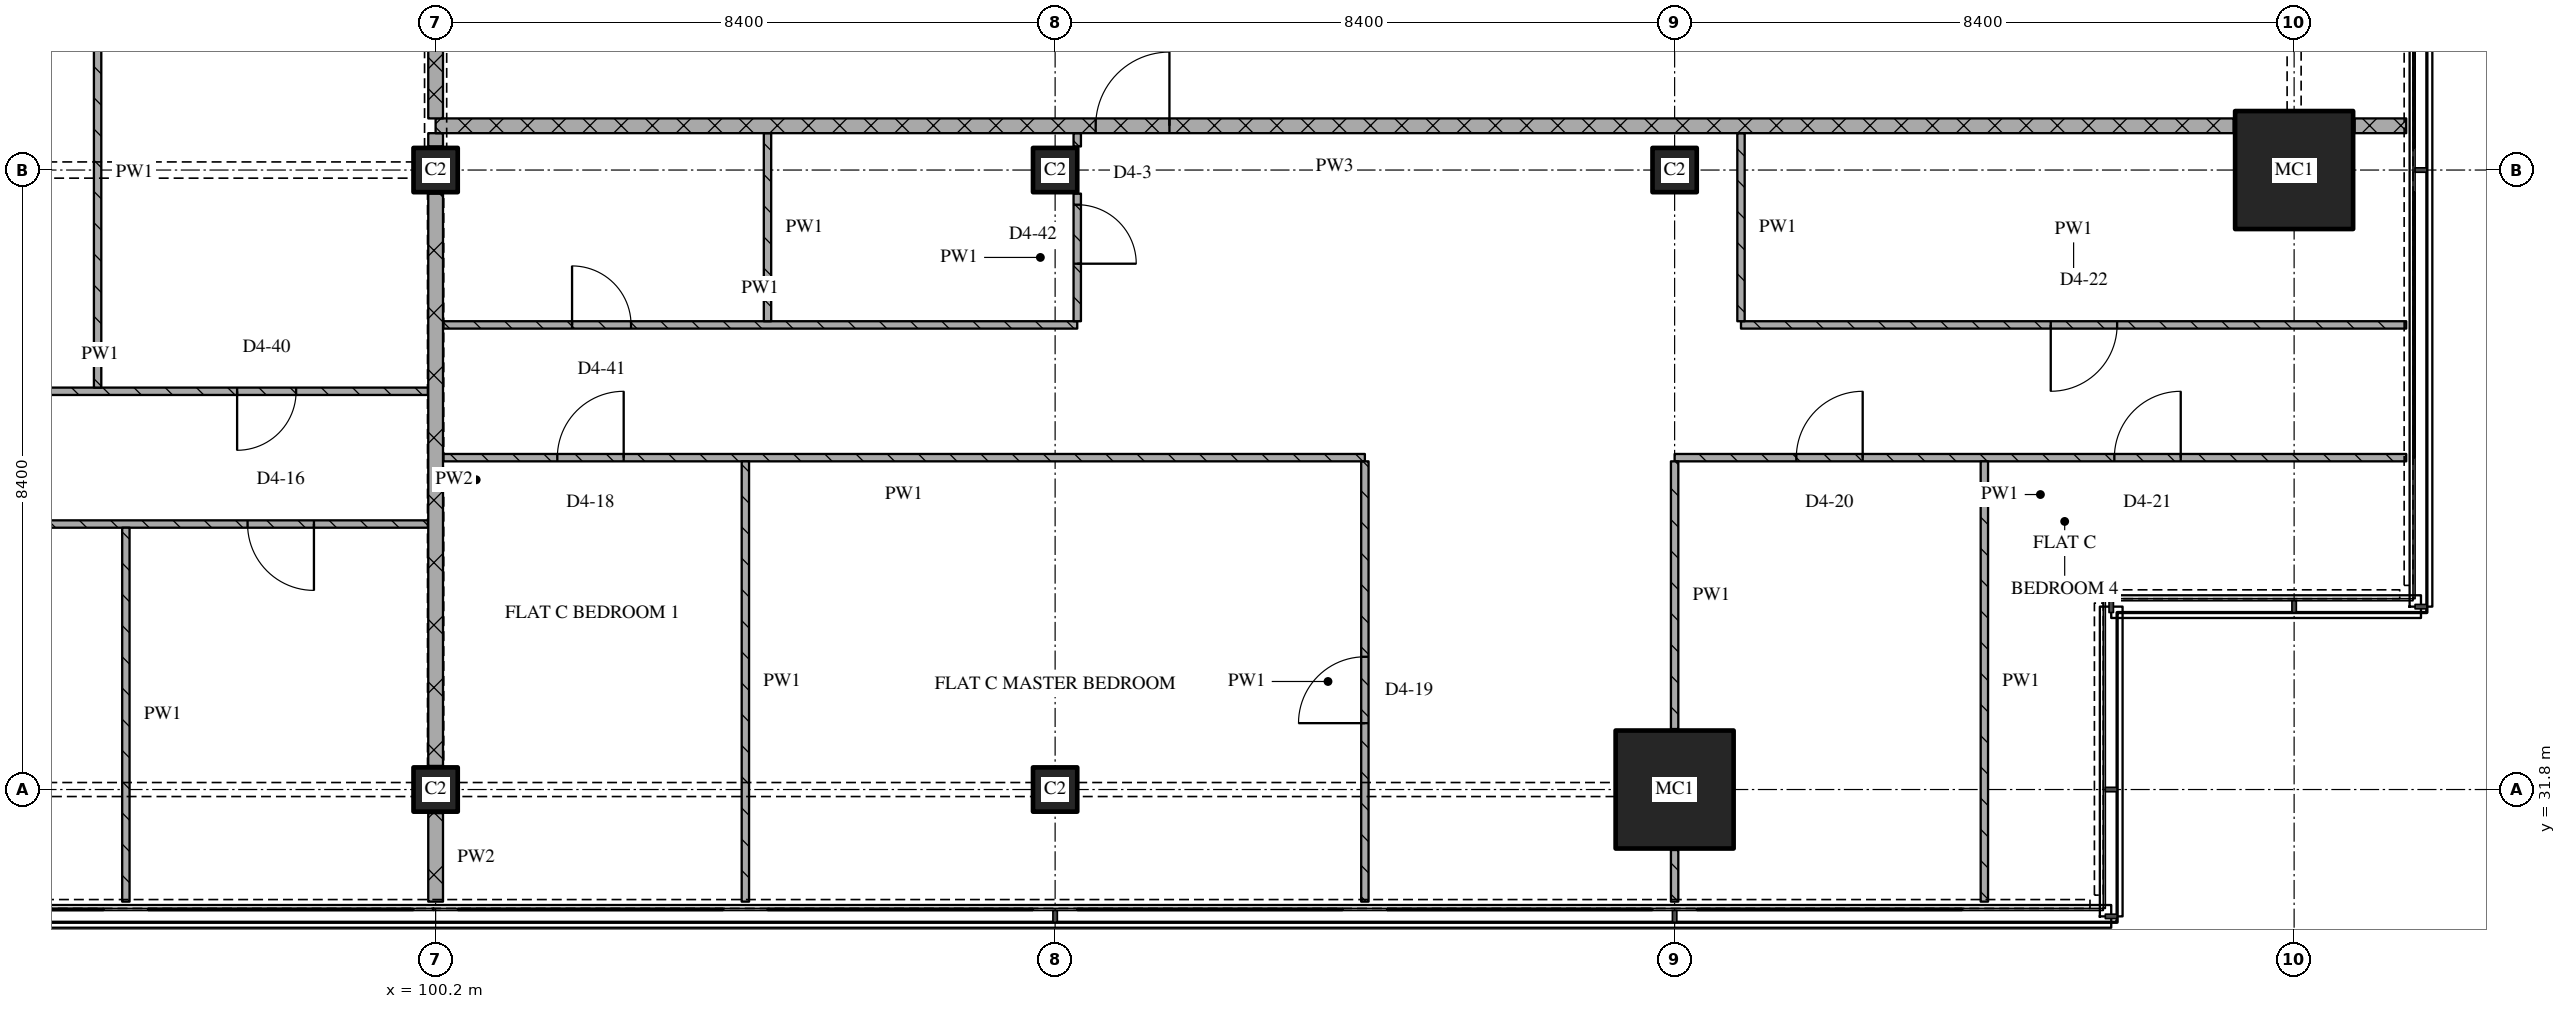
"""IFC4 building model, lengths in metres.
Left out: names, types, materials, properties, quantities, classifications, styles, units other than length and angle.
Written with IfcOpenShell. Run it as: python <this file> out.ifc"""

import sys

from ifc_helpers import new_model, si_unit, direction, frame, frame_2d, origin, origin_2d, place, context, subcontext, project, spatial, rectangle, extrude, element, fill, save


model = new_model("IFC4")
c1 = context("Model", 3, precision=1e-05, world=origin(), true_north=direction((0.0, 1.0)))
c2 = subcontext(c1, "Body", "Model", "MODEL_VIEW")
j1 = project(units=[si_unit("LENGTHUNIT", "METRE"), si_unit("PLANEANGLEUNIT", "RADIAN")], contexts=[c1])
p1 = place(None, origin())
s1 = spatial("IfcSite", under=j1, at=p1, CompositionType="ELEMENT")
p2 = place(p1, origin())
s2 = spatial("IfcBuilding", under=s1, at=p2, CompositionType="ELEMENT")
p3 = place(p2, frame((0.0, 0.0, 241.5)))
s3 = spatial("IfcBuildingStorey", under=s2, at=p3, CompositionType="ELEMENT", Elevation=241.5)
for number, where, z_axis, x_axis in (
    (1, (100.2, 31.8, 0.0), (0.0, 0.0, 1.0), (1.0, 0.0, 0.0)),
    (2, (100.2, 40.2, 0.0), (0.0, 0.0, 1.0), (1.0, 0.0, 0.0)),
    (3, (108.6, 31.8, 0.0), (0.0, 0.0, 1.0), (1.0, 0.0, 0.0)),
    (4, (108.6, 40.2, 0.0), (0.0, 0.0, 1.0), (1.0, 0.0, 0.0)),
):
    element("IfcColumn", number, at=place(p3, frame(where, z_axis=z_axis, x_axis=x_axis)), inside=s3, PredefinedType="COLUMN", context=c2, shape_type="SweptSolid", body=[
        extrude(rectangle(XDim=0.6, YDim=0.6, at=origin_2d()), origin(), (0.0, 0.0, 1.0), 3.6),
    ])
p4 = place(p3, frame((117.0, 31.8, 0.0), z_axis=(0.0, 0.0, 1.0), x_axis=(1.0, 0.0, 0.0)))
e5 = element("IfcColumn", 5, at=p4, inside=s3, PredefinedType="COLUMN", context=c2, shape_type="SweptSolid", body=[
    extrude(rectangle(XDim=1.6, YDim=1.6, at=origin_2d()), origin(), (0.0, 0.0, 1.0), 3.6),
])
p5 = place(p3, frame((117.0, 40.2, 0.0), z_axis=(0.0, 0.0, 1.0), x_axis=(1.0, 0.0, 0.0)))
e6 = element("IfcColumn", 6, at=p5, inside=s3, PredefinedType="COLUMN", context=c2, shape_type="SweptSolid", body=[
    extrude(rectangle(XDim=0.6, YDim=0.6, at=origin_2d()), origin(), (0.0, 0.0, 1.0), 3.6),
])
p6 = place(p3, frame((125.4, 40.2, 0.0), z_axis=(0.0, 0.0, 1.0), x_axis=(1.0, 0.0, 0.0)))
e7 = element("IfcColumn", 7, at=p6, inside=s3, PredefinedType="COLUMN", context=c2, shape_type="SweptSolid", body=[
    extrude(rectangle(XDim=1.6, YDim=1.6, at=origin_2d()), origin(), (0.0, 0.0, 1.0), 3.6),
])
p7 = place(p3, frame((100.1, 35.4, 0.0), z_axis=(0.0, 0.0, 1.0), x_axis=(-1.0, 0.0, 0.0)))
e8 = element("IfcWall", 8, at=p7, inside=s3, PredefinedType="PARTITIONING", context=c2, shape_type="SweptSolid", body=[
    extrude(rectangle(XDim=20.9, YDim=0.1, at=frame_2d((10.45, 0.0))), origin(), (0.0, 0.0, 1.0), 3.32),
])
p8 = place(p7, frame((1.55, 0.0, 0.0)))
e9 = element("IfcOpeningElement", 9, at=p8, cuts=e8, PredefinedType="OPENING", context=c2, shape_type="SweptSolid", body=[
    extrude(rectangle(XDim=0.9, YDim=2.1, at=frame_2d((0.45, 1.05))), frame((0.0, 0.06, 0.0), z_axis=(0.0, -1.0, 0.0), x_axis=(1.0, 0.0, 0.0)), (0.0, 0.0, 1.0), 0.12),
])
p9 = place(p7, frame((7.85, 0.0, 0.0)))
e10 = element("IfcOpeningElement", 10, at=p9, cuts=e8, PredefinedType="OPENING", context=c2, shape_type="SweptSolid", body=[
    extrude(rectangle(XDim=0.9, YDim=2.1, at=frame_2d((0.45, 1.05))), frame((0.0, 0.06, 0.0), z_axis=(0.0, -1.0, 0.0), x_axis=(1.0, 0.0, 0.0)), (0.0, 0.0, 1.0), 0.12),
])
p10 = place(p7, frame((16.25, 0.0, 0.0)))
e11 = element("IfcOpeningElement", 11, at=p10, cuts=e8, PredefinedType="OPENING", context=c2, shape_type="SweptSolid", body=[
    extrude(rectangle(XDim=0.9, YDim=2.1, at=frame_2d((0.45, 1.05))), frame((0.0, 0.06, 0.0), z_axis=(0.0, -1.0, 0.0), x_axis=(1.0, 0.0, 0.0)), (0.0, 0.0, 1.0), 0.12),
])
p11 = place(p3, frame((112.8, 36.3, 0.0), z_axis=(0.0, 0.0, 1.0), x_axis=(-1.0, 0.0, 0.0)))
e12 = element("IfcWall", 12, at=p11, inside=s3, PredefinedType="PARTITIONING", context=c2, shape_type="SweptSolid", body=[
    extrude(rectangle(XDim=12.5, YDim=0.1, at=frame_2d((6.25, 0.0))), origin(), (0.0, 0.0, 1.0), 3.32),
])
p12 = place(p11, frame((10.05, 0.0, 0.0)))
e13 = element("IfcOpeningElement", 13, at=p12, cuts=e12, PredefinedType="OPENING", context=c2, shape_type="SweptSolid", body=[
    extrude(rectangle(XDim=0.9, YDim=2.1, at=frame_2d((0.45, 1.05))), frame((0.0, 0.06, 0.0), z_axis=(0.0, -1.0, 0.0), x_axis=(1.0, 0.0, 0.0)), (0.0, 0.0, 1.0), 0.12),
])
p13 = place(p3, frame((126.92, 36.3, 0.0), z_axis=(0.0, 0.0, 1.0), x_axis=(-1.0, 0.0, 0.0)))
e14 = element("IfcWall", 14, at=p13, inside=s3, PredefinedType="PARTITIONING", context=c2, shape_type="SweptSolid", body=[
    extrude(rectangle(XDim=9.92, YDim=0.1, at=frame_2d((4.96, 0.0))), origin(), (0.0, 0.0, 1.0), 3.32),
])
p14 = place(p13, frame((3.058, 0.0, 0.0)))
e15 = element("IfcOpeningElement", 15, at=p14, cuts=e14, PredefinedType="OPENING", context=c2, shape_type="SweptSolid", body=[
    extrude(rectangle(XDim=0.9, YDim=2.1, at=frame_2d((0.45, 1.05))), frame((0.0, 0.06, 0.0), z_axis=(0.0, -1.0, 0.0), x_axis=(1.0, 0.0, 0.0)), (0.0, 0.0, 1.0), 0.12),
])
p15 = place(p13, frame((7.37, 0.0, 0.0)))
e16 = element("IfcOpeningElement", 16, at=p15, cuts=e14, PredefinedType="OPENING", context=c2, shape_type="SweptSolid", body=[
    extrude(rectangle(XDim=0.9, YDim=2.1, at=frame_2d((0.45, 1.05))), frame((0.0, 0.06, 0.0), z_axis=(0.0, -1.0, 0.0), x_axis=(1.0, 0.0, 0.0)), (0.0, 0.0, 1.0), 0.12),
])
p16 = place(p3, frame((91.2, 37.2, 0.0), z_axis=(0.0, 0.0, 1.0), x_axis=(1.0, 0.0, 0.0)))
e17 = element("IfcWall", 17, at=p16, inside=s3, PredefinedType="PARTITIONING", context=c2, shape_type="SweptSolid", body=[
    extrude(rectangle(XDim=8.9, YDim=0.1, at=frame_2d((4.45, 0.0))), origin(), (0.0, 0.0, 1.0), 3.32),
])
p17 = place(p16, frame((6.308, 0.0, 0.0)))
e18 = element("IfcOpeningElement", 18, at=p17, cuts=e17, PredefinedType="OPENING", context=c2, shape_type="SweptSolid", body=[
    extrude(rectangle(XDim=0.8, YDim=2.1, at=frame_2d((0.4, 1.05))), frame((0.0, 0.06, 0.0), z_axis=(0.0, -1.0, 0.0), x_axis=(1.0, 0.0, 0.0)), (0.0, 0.0, 1.0), 0.12),
])
p18 = place(p3, frame((100.3, 38.1, 0.0), z_axis=(0.0, 0.0, 1.0), x_axis=(1.0, 0.0, 0.0)))
e19 = element("IfcWall", 19, at=p18, inside=s3, PredefinedType="PARTITIONING", context=c2, shape_type="SweptSolid", body=[
    extrude(rectangle(XDim=8.6, YDim=0.1, at=frame_2d((4.3, 0.0))), origin(), (0.0, 0.0, 1.0), 3.32),
])
p19 = place(p18, frame((1.75, 0.0, 0.0)))
e20 = element("IfcOpeningElement", 20, at=p19, cuts=e19, PredefinedType="OPENING", context=c2, shape_type="SweptSolid", body=[
    extrude(rectangle(XDim=0.8, YDim=2.1, at=frame_2d((0.4, 1.05))), frame((0.0, 0.06, 0.0), z_axis=(0.0, -1.0, 0.0), x_axis=(1.0, 0.0, 0.0)), (0.0, 0.0, 1.0), 0.12),
])
p20 = place(p3, frame((117.9, 38.1, 0.0), z_axis=(0.0, 0.0, 1.0), x_axis=(1.0, 0.0, 0.0)))
e21 = element("IfcWall", 21, at=p20, inside=s3, PredefinedType="PARTITIONING", context=c2, shape_type="SweptSolid", body=[
    extrude(rectangle(XDim=9.02, YDim=0.1, at=frame_2d((4.51, 0.0))), origin(), (0.0, 0.0, 1.0), 3.32),
])
p21 = place(p20, frame((4.2, 0.0, 0.0)))
e22 = element("IfcOpeningElement", 22, at=p21, cuts=e21, PredefinedType="OPENING", context=c2, shape_type="SweptSolid", body=[
    extrude(rectangle(XDim=0.9, YDim=2.1, at=frame_2d((0.45, 1.05))), frame((0.0, 0.06, 0.0), z_axis=(0.0, -1.0, 0.0), x_axis=(1.0, 0.0, 0.0)), (0.0, 0.0, 1.0), 0.12),
])
p22 = place(p3, frame((124.58, 40.8, 0.0), z_axis=(0.0, 0.0, 1.0), x_axis=(-1.0, 0.0, 0.0)))
e23 = element("IfcWall", 23, at=p22, inside=s3, PredefinedType="PARTITIONING", context=c2, shape_type="SweptSolid", body=[
    extrude(rectangle(XDim=24.38, YDim=0.2, at=frame_2d((12.19, 0.0))), origin(), (0.0, 0.0, 1.0), 3.32),
])
p23 = place(p22, frame((14.43, 0.0, 0.0)))
e24 = element("IfcOpeningElement", 24, at=p23, cuts=e23, PredefinedType="OPENING", context=c2, shape_type="SweptSolid", body=[
    extrude(rectangle(XDim=1.0, YDim=2.1, at=frame_2d((0.5, 1.05))), frame((0.0, 0.11, 0.0), z_axis=(0.0, -1.0, 0.0), x_axis=(1.0, 0.0, 0.0)), (0.0, 0.0, 1.0), 0.22),
])
p24 = place(p3, frame((126.22, 40.8, 0.0), z_axis=(0.0, 0.0, 1.0), x_axis=(1.0, 0.0, 0.0)))
e25 = element("IfcWall", 25, at=p24, inside=s3, PredefinedType="PARTITIONING", context=c2, shape_type="SweptSolid", body=[
    extrude(rectangle(XDim=0.7, YDim=0.2, at=frame_2d((0.35, 0.0))), origin(), (0.0, 0.0, 1.0), 3.32),
])
p25 = place(p3, frame((95.617, 43.1, 0.0), z_axis=(0.0, 0.0, 1.0), x_axis=(0.0, -1.0, 0.0)))
e26 = element("IfcWall", 26, at=p25, inside=s3, PredefinedType="PARTITIONING", context=c2, shape_type="SweptSolid", body=[
    extrude(rectangle(XDim=5.85, YDim=0.1, at=frame_2d((2.925, 0.0))), origin(), (0.0, 0.0, 1.0), 3.32),
])
p26 = place(p3, frame((96.0, 35.35, 0.0), z_axis=(0.0, 0.0, 1.0), x_axis=(0.0, -1.0, 0.0)))
e27 = element("IfcWall", 27, at=p26, inside=s3, PredefinedType="PARTITIONING", context=c2, shape_type="SweptSolid", body=[
    extrude(rectangle(XDim=5.07, YDim=0.1, at=frame_2d((2.535, 0.0))), origin(), (0.0, 0.0, 1.0), 3.32),
])
p27 = place(p3, frame((100.2, 43.1, 0.0), z_axis=(0.0, 0.0, 1.0), x_axis=(0.0, -1.0, 0.0)))
e28 = element("IfcWall", 28, at=p27, inside=s3, PredefinedType="PARTITIONING", context=c2, shape_type="SweptSolid", body=[
    extrude(rectangle(XDim=2.2, YDim=0.2, at=frame_2d((1.1, 0.0))), origin(), (0.0, 0.0, 1.0), 2.53),
])
p28 = place(p3, frame((100.2, 31.48, 0.0), z_axis=(0.0, 0.0, 1.0), x_axis=(0.0, -1.0, 0.0)))
e29 = element("IfcWall", 29, at=p28, inside=s3, PredefinedType="PARTITIONING", context=c2, shape_type="SweptSolid", body=[
    extrude(rectangle(XDim=1.2, YDim=0.2, at=frame_2d((0.6, 0.0))), origin(), (0.0, 0.0, 1.0), 3.32),
])
p29 = place(p3, frame((100.2, 39.88, 0.0), z_axis=(0.0, 0.0, 1.0), x_axis=(0.0, -1.0, 0.0)))
e30 = element("IfcWall", 30, at=p29, inside=s3, PredefinedType="PARTITIONING", context=c2, shape_type="SweptSolid", body=[
    extrude(rectangle(XDim=7.76, YDim=0.2, at=frame_2d((3.88, 0.0))), origin(), (0.0, 0.0, 1.0), 2.72),
])
p30 = place(p3, frame((100.2, 40.7, 0.0), z_axis=(0.0, 0.0, 1.0), x_axis=(0.0, -1.0, 0.0)))
e31 = element("IfcWall", 31, at=p30, inside=s3, PredefinedType="PARTITIONING", context=c2, shape_type="SweptSolid", body=[
    extrude(rectangle(XDim=0.18, YDim=0.2, at=frame_2d((0.09, 0.0))), origin(), (0.0, 0.0, 1.0), 3.32),
])
p31 = place(p3, frame((104.4, 36.25, 0.0), z_axis=(0.0, 0.0, 1.0), x_axis=(0.0, -1.0, 0.0)))
e32 = element("IfcWall", 32, at=p31, inside=s3, PredefinedType="PARTITIONING", context=c2, shape_type="SweptSolid", body=[
    extrude(rectangle(XDim=5.97, YDim=0.1, at=frame_2d((2.985, 0.0))), origin(), (0.0, 0.0, 1.0), 3.32),
])
p32 = place(p3, frame((104.7, 40.7, 0.0), z_axis=(0.0, 0.0, 1.0), x_axis=(0.0, -1.0, 0.0)))
e33 = element("IfcWall", 33, at=p32, inside=s3, PredefinedType="PARTITIONING", context=c2, shape_type="SweptSolid", body=[
    extrude(rectangle(XDim=2.55, YDim=0.1, at=frame_2d((1.275, 0.0))), origin(), (0.0, 0.0, 1.0), 3.32),
])
p33 = place(p3, frame((108.9, 38.15, 0.0), z_axis=(0.0, 0.0, 1.0), x_axis=(0.0, 1.0, 0.0)))
e34 = element("IfcWall", 34, at=p33, inside=s3, PredefinedType="PARTITIONING", context=c2, shape_type="SweptSolid", body=[
    extrude(rectangle(XDim=1.73, YDim=0.1, at=frame_2d((0.865, 0.0))), origin(), (0.0, 0.0, 1.0), 3.32),
])
p34 = place(p33, frame((0.78, 0.0, 0.0)))
e35 = element("IfcOpeningElement", 35, at=p34, cuts=e34, PredefinedType="OPENING", context=c2, shape_type="SweptSolid", body=[
    extrude(rectangle(XDim=0.8, YDim=2.1, at=frame_2d((0.4, 1.05))), frame((0.0, 0.06, 0.0), z_axis=(0.0, -1.0, 0.0), x_axis=(1.0, 0.0, 0.0)), (0.0, 0.0, 1.0), 0.12),
])
p35 = place(p3, frame((108.9, 40.7, 0.0), z_axis=(0.0, 0.0, 1.0), x_axis=(0.0, -1.0, 0.0)))
e36 = element("IfcWall", 36, at=p35, inside=s3, PredefinedType="PARTITIONING", context=c2, shape_type="SweptSolid", body=[
    extrude(rectangle(XDim=0.18, YDim=0.1, at=frame_2d((0.09, 0.0))), origin(), (0.0, 0.0, 1.0), 3.32),
])
p36 = place(p3, frame((112.8, 30.28, 0.0), z_axis=(0.0, 0.0, 1.0), x_axis=(0.0, 1.0, 0.0)))
e37 = element("IfcWall", 37, at=p36, inside=s3, PredefinedType="PARTITIONING", context=c2, shape_type="SweptSolid", body=[
    extrude(rectangle(XDim=5.97, YDim=0.1, at=frame_2d((2.985, 0.0))), origin(), (0.0, 0.0, 1.0), 3.32),
])
p37 = place(p36, frame((2.42, 0.0, 0.0)))
e38 = element("IfcOpeningElement", 38, at=p37, cuts=e37, PredefinedType="OPENING", context=c2, shape_type="SweptSolid", body=[
    extrude(rectangle(XDim=0.9, YDim=2.1, at=frame_2d((0.45, 1.05))), frame((0.0, 0.06, 0.0), z_axis=(0.0, -1.0, 0.0), x_axis=(1.0, 0.0, 0.0)), (0.0, 0.0, 1.0), 0.12),
])
p38 = place(p3, frame((117.0, 30.98, 0.0), z_axis=(0.0, 0.0, 1.0), x_axis=(0.0, -1.0, 0.0)))
e39 = element("IfcWall", 39, at=p38, inside=s3, PredefinedType="PARTITIONING", context=c2, shape_type="SweptSolid", body=[
    extrude(rectangle(XDim=0.7, YDim=0.1, at=frame_2d((0.35, 0.0))), origin(), (0.0, 0.0, 1.0), 3.32),
])
p39 = place(p3, frame((117.0, 36.25, 0.0), z_axis=(0.0, 0.0, 1.0), x_axis=(0.0, -1.0, 0.0)))
e40 = element("IfcWall", 40, at=p39, inside=s3, PredefinedType="PARTITIONING", context=c2, shape_type="SweptSolid", body=[
    extrude(rectangle(XDim=3.63, YDim=0.1, at=frame_2d((1.815, 0.0))), origin(), (0.0, 0.0, 1.0), 3.32),
])
p40 = place(p3, frame((117.9, 40.7, 0.0), z_axis=(0.0, 0.0, 1.0), x_axis=(0.0, -1.0, 0.0)))
e41 = element("IfcWall", 41, at=p40, inside=s3, PredefinedType="PARTITIONING", context=c2, shape_type="SweptSolid", body=[
    extrude(rectangle(XDim=2.55, YDim=0.1, at=frame_2d((1.275, 0.0))), origin(), (0.0, 0.0, 1.0), 3.32),
])
p41 = place(p3, frame((121.2, 36.25, 0.0), z_axis=(0.0, 0.0, 1.0), x_axis=(0.0, -1.0, 0.0)))
e42 = element("IfcWall", 42, at=p41, inside=s3, PredefinedType="PARTITIONING", context=c2, shape_type="SweptSolid", body=[
    extrude(rectangle(XDim=5.97, YDim=0.1, at=frame_2d((2.985, 0.0))), origin(), (0.0, 0.0, 1.0), 3.32),
])
p42 = place(p8, origin())
e43 = element("IfcDoor", 43, at=p42, inside=s3, OperationType="SINGLE_SWING_LEFT", PredefinedType="DOOR", context=c2, shape_type="SweptSolid", body=[
    extrude(rectangle(XDim=0.9, YDim=2.1, at=frame_2d((0.45, 1.05))), frame((0.0, 0.025, 0.0), z_axis=(0.0, -1.0, 0.0), x_axis=(1.0, 0.0, 0.0)), (0.0, 0.0, 1.0), 0.05),
])
fill(e9, e43)
p43 = place(p12, origin())
e44 = element("IfcDoor", 44, at=p43, inside=s3, OperationType="SINGLE_SWING_RIGHT", PredefinedType="DOOR", context=c2, shape_type="SweptSolid", body=[
    extrude(rectangle(XDim=0.9, YDim=2.1, at=frame_2d((0.45, 1.05))), frame((0.0, 0.025, 0.0), z_axis=(0.0, -1.0, 0.0), x_axis=(1.0, 0.0, 0.0)), (0.0, 0.0, 1.0), 0.05),
])
fill(e13, e44)
p44 = place(p14, origin())
e45 = element("IfcDoor", 45, at=p44, inside=s3, OperationType="SINGLE_SWING_RIGHT", PredefinedType="DOOR", context=c2, shape_type="SweptSolid", body=[
    extrude(rectangle(XDim=0.9, YDim=2.1, at=frame_2d((0.45, 1.05))), frame((0.0, 0.025, 0.0), z_axis=(0.0, -1.0, 0.0), x_axis=(1.0, 0.0, 0.0)), (0.0, 0.0, 1.0), 0.05),
])
fill(e15, e45)
p45 = place(p15, origin())
e46 = element("IfcDoor", 46, at=p45, inside=s3, OperationType="SINGLE_SWING_RIGHT", PredefinedType="DOOR", context=c2, shape_type="SweptSolid", body=[
    extrude(rectangle(XDim=0.9, YDim=2.1, at=frame_2d((0.45, 1.05))), frame((0.0, 0.025, 0.0), z_axis=(0.0, -1.0, 0.0), x_axis=(1.0, 0.0, 0.0)), (0.0, 0.0, 1.0), 0.05),
])
fill(e16, e46)
p46 = place(p17, origin())
e47 = element("IfcDoor", 47, at=p46, inside=s3, OperationType="SINGLE_SWING_RIGHT", PredefinedType="DOOR", context=c2, shape_type="SweptSolid", body=[
    extrude(rectangle(XDim=0.8, YDim=2.1, at=frame_2d((0.4, 1.05))), frame((0.0, 0.025, 0.0), z_axis=(0.0, -1.0, 0.0), x_axis=(1.0, 0.0, 0.0)), (0.0, 0.0, 1.0), 0.05),
])
fill(e18, e47)
p47 = place(p19, origin())
e48 = element("IfcDoor", 48, at=p47, inside=s3, OperationType="SINGLE_SWING_LEFT", PredefinedType="DOOR", context=c2, shape_type="SweptSolid", body=[
    extrude(rectangle(XDim=0.8, YDim=2.1, at=frame_2d((0.4, 1.05))), frame((0.0, 0.025, 0.0), z_axis=(0.0, -1.0, 0.0), x_axis=(1.0, 0.0, 0.0)), (0.0, 0.0, 1.0), 0.05),
])
fill(e20, e48)
p48 = place(p21, origin())
e49 = element("IfcDoor", 49, at=p48, inside=s3, OperationType="SINGLE_SWING_RIGHT", PredefinedType="DOOR", context=c2, shape_type="SweptSolid", body=[
    extrude(rectangle(XDim=0.9, YDim=2.1, at=frame_2d((0.45, 1.05))), frame((0.0, 0.025, 0.0), z_axis=(0.0, -1.0, 0.0), x_axis=(1.0, 0.0, 0.0)), (0.0, 0.0, 1.0), 0.05),
])
fill(e22, e49)
p49 = place(p23, origin())
e50 = element("IfcDoor", 50, at=p49, inside=s3, OperationType="SINGLE_SWING_RIGHT", PredefinedType="DOOR", context=c2, shape_type="SweptSolid", body=[
    extrude(rectangle(XDim=1.0, YDim=2.1, at=frame_2d((0.5, 1.05))), frame((0.0, 0.025, 0.0), z_axis=(0.0, -1.0, 0.0), x_axis=(1.0, 0.0, 0.0)), (0.0, 0.0, 1.0), 0.05),
])
fill(e24, e50)
p50 = place(p34, origin())
e51 = element("IfcDoor", 51, at=p50, inside=s3, OperationType="SINGLE_SWING_RIGHT", PredefinedType="DOOR", context=c2, shape_type="SweptSolid", body=[
    extrude(rectangle(XDim=0.8, YDim=2.1, at=frame_2d((0.4, 1.05))), frame((0.0, 0.025, 0.0), z_axis=(0.0, -1.0, 0.0), x_axis=(1.0, 0.0, 0.0)), (0.0, 0.0, 1.0), 0.05),
])
fill(e35, e51)
p51 = place(p37, origin())
e52 = element("IfcDoor", 52, at=p51, inside=s3, OperationType="SINGLE_SWING_LEFT", PredefinedType="DOOR", context=c2, shape_type="SweptSolid", body=[
    extrude(rectangle(XDim=0.9, YDim=2.1, at=frame_2d((0.45, 1.05))), frame((0.0, 0.025, 0.0), z_axis=(0.0, -1.0, 0.0), x_axis=(1.0, 0.0, 0.0)), (0.0, 0.0, 1.0), 0.05),
])
fill(e38, e52)
save(model, sys.argv[1])
